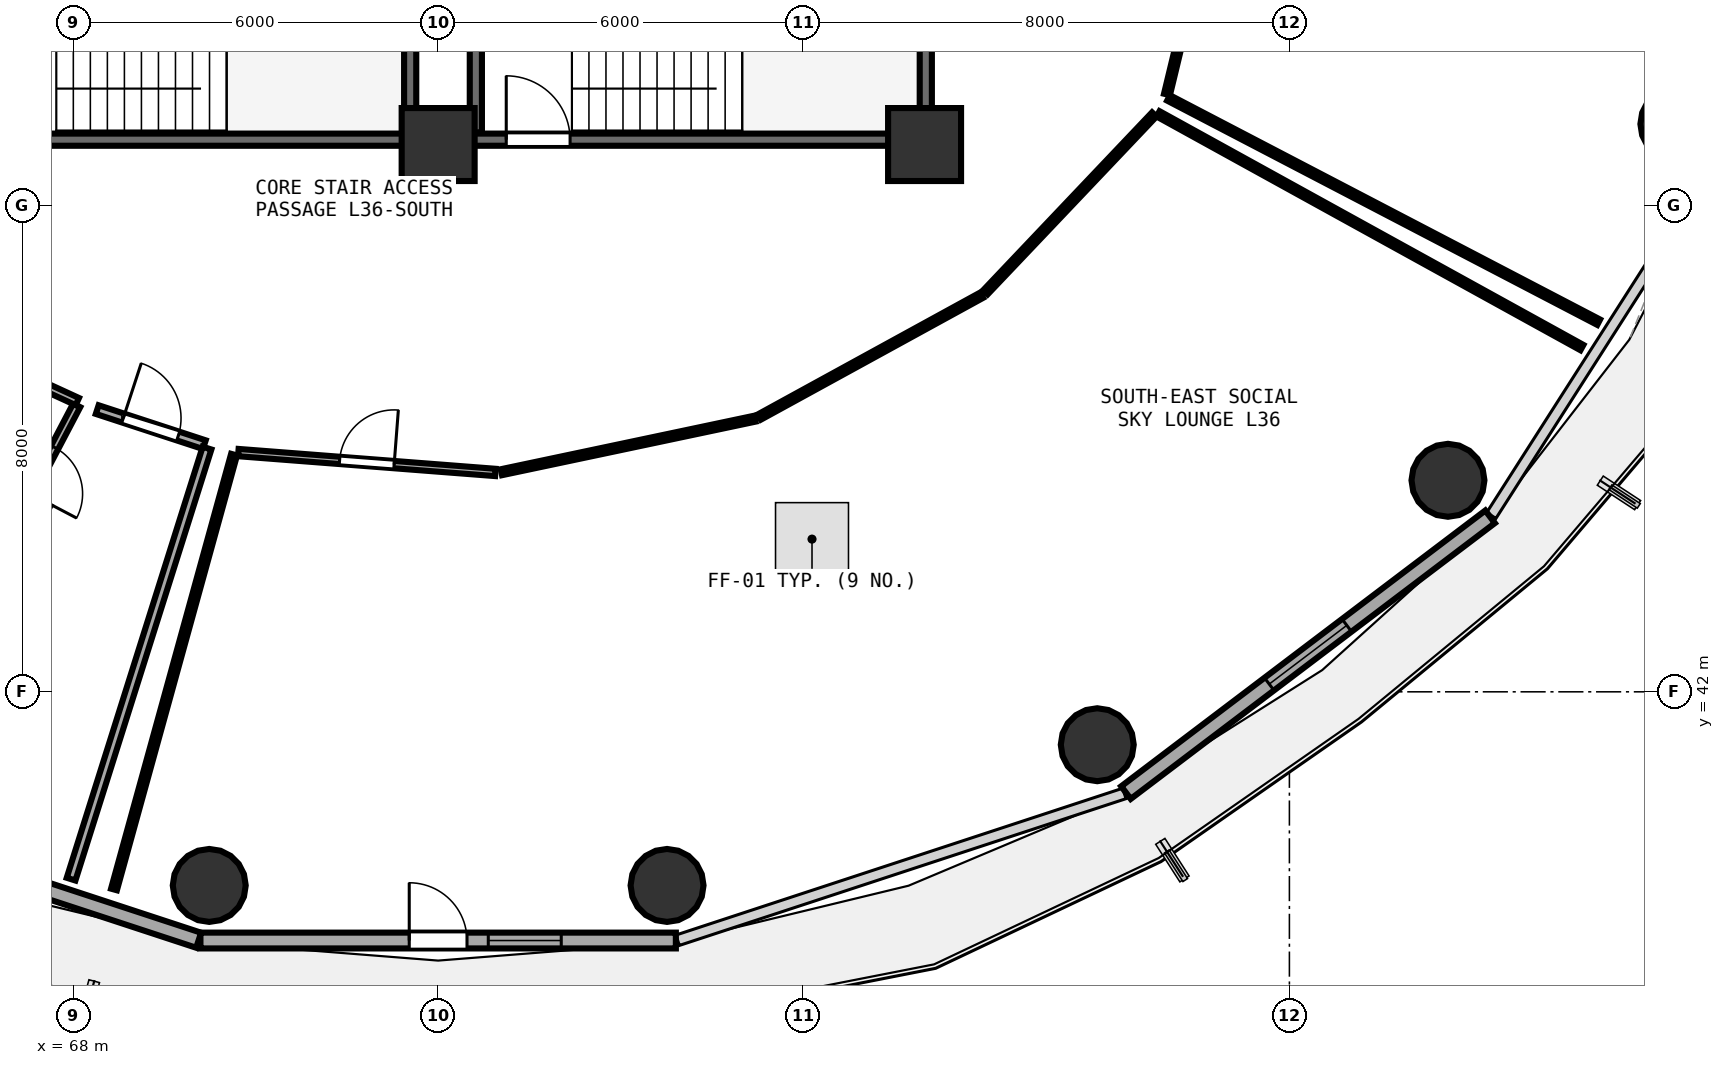
"""IFC4 building model, lengths in metres.
Left out: names, types, materials, properties, quantities, classifications, styles, units other than length and angle.
Written with IfcOpenShell. Run it as: python <this file> out.ifc"""

import sys

from ifc_helpers import new_model, si_unit, direction, frame, frame_2d, origin, origin_2d, place, context, subcontext, project, spatial, rectangle, circle, extrude, element, fill, save


model = new_model("IFC4")
c1 = context("Model", 3, precision=1e-05, world=origin(), true_north=direction((0.0, 1.0)))
c2 = subcontext(c1, "Body", "Model", "MODEL_VIEW")
j1 = project(units=[si_unit("LENGTHUNIT", "METRE"), si_unit("PLANEANGLEUNIT", "RADIAN")], contexts=[c1])
p1 = place(None, origin())
s1 = spatial("IfcSite", under=j1, at=p1, CompositionType="ELEMENT")
p2 = place(p1, origin())
s2 = spatial("IfcBuilding", under=s1, at=p2, CompositionType="ELEMENT")
p3 = place(p2, frame((0.0, 0.0, 143.1)))
s3 = spatial("IfcBuildingStorey", under=s2, at=p3, CompositionType="ELEMENT", Elevation=143.1)
for number, where, z_axis, x_axis in (
    (1, (74.0, 51.0, 0.0), (0.0, 0.0, 1.0), (1.0, 0.0, 0.0)),
    (2, (82.0, 51.0, 0.0), (0.0, 0.0, 1.0), (1.0, 0.0, 0.0)),
):
    element("IfcColumn", number, at=place(p3, frame(where, z_axis=z_axis, x_axis=x_axis)), inside=s3, PredefinedType="PILASTER", context=c2, shape_type="SweptSolid", body=[
        extrude(rectangle(XDim=1.2, YDim=1.2, at=origin_2d()), origin(), (0.0, 0.0, 1.0), 3.75),
    ])
for number, where, z_axis, x_axis in (
    (3, (70.235, 38.816, 0.0), (0.0, 0.0, 1.0), (1.0, 0.0, 0.0)),
    (4, (77.765, 38.816, 0.0), (0.0, 0.0, 1.0), (1.0, 0.0, 0.0)),
    (5, (84.84, 41.13, 0.0), (0.0, 0.0, 1.0), (1.0, 0.0, 0.0)),
    (6, (90.608, 45.479, 0.0), (0.0, 0.0, 1.0), (1.0, 0.0, 0.0)),
    (7, (94.373, 51.337, 0.0), (0.0, 0.0, 1.0), (1.0, 0.0, 0.0)),
):
    element("IfcColumn", number, at=place(p3, frame(where, z_axis=z_axis, x_axis=x_axis)), inside=s3, PredefinedType="COLUMN", context=c2, shape_type="SweptSolid", body=[
        extrude(circle(Radius=0.6, at=origin_2d()), origin(), (0.0, 0.0, 1.0), 3.75),
    ])
p4 = place(p3, frame((62.714, 40.328, 0.0), z_axis=(0.0, 0.0, 1.0), x_axis=(0.950038302428, -0.312133343173, 0.0)))
e8 = element("IfcWall", 8, at=p4, inside=s3, PredefinedType="SOLIDWALL", context=c2, shape_type="SweptSolid", body=[
    extrude(rectangle(XDim=7.733, YDim=0.26, at=frame_2d((3.867, 0.0))), origin(), (0.0, 0.0, 1.0), 3.475),
])
p5 = place(p4, frame((3.067, 0.0, 0.85)))
e9 = element("IfcOpeningElement", 9, at=p5, cuts=e8, PredefinedType="OPENING", context=c2, shape_type="SweptSolid", body=[
    extrude(rectangle(XDim=1.6, YDim=1.45, at=frame_2d((0.8, 0.725))), frame((0.0, 0.14, 0.0), z_axis=(0.0, -1.0, 0.0), x_axis=(1.0, 0.0, 0.0)), (0.0, 0.0, 1.0), 0.28),
])
p6 = place(p3, frame((70.091, 37.91, 0.0), z_axis=(0.0, 0.0, 1.0), x_axis=(1.0, 0.0, 0.0)))
e10 = element("IfcWall", 10, at=p6, inside=s3, PredefinedType="SOLIDWALL", context=c2, shape_type="SweptSolid", body=[
    extrude(rectangle(XDim=7.819, YDim=0.26, at=frame_2d((3.909, 0.0))), origin(), (0.0, 0.0, 1.0), 3.475),
])
p7 = place(p6, frame((3.434, 0.0, 0.0)))
e11 = element("IfcOpeningElement", 11, at=p7, cuts=e10, PredefinedType="OPENING", context=c2, shape_type="SweptSolid", body=[
    extrude(rectangle(XDim=0.95, YDim=2.1, at=frame_2d((0.475, 1.05))), frame((0.0, 0.14, 0.0), z_axis=(0.0, -1.0, 0.0), x_axis=(1.0, 0.0, 0.0)), (0.0, 0.0, 1.0), 0.28),
])
p8 = place(p6, frame((4.734, 0.0, 0.85)))
e12 = element("IfcOpeningElement", 12, at=p8, cuts=e10, PredefinedType="OPENING", context=c2, shape_type="SweptSolid", body=[
    extrude(rectangle(XDim=1.2, YDim=1.45, at=frame_2d((0.6, 0.725))), frame((0.0, 0.14, 0.0), z_axis=(0.0, -1.0, 0.0), x_axis=(1.0, 0.0, 0.0)), (0.0, 0.0, 1.0), 0.28),
])
p9 = place(p3, frame((85.312, 40.342, 0.0), z_axis=(0.0, 0.0, 1.0), x_axis=(0.797163719609, 0.603763202042, 0.0)))
e13 = element("IfcWall", 13, at=p9, inside=s3, PredefinedType="SOLIDWALL", context=c2, shape_type="SweptSolid", body=[
    extrude(rectangle(XDim=7.512, YDim=0.26, at=frame_2d((3.756, 0.0))), origin(), (0.0, 0.0, 1.0), 3.475),
])
p10 = place(p9, frame((2.956, 0.0, 0.85)))
e14 = element("IfcOpeningElement", 14, at=p10, cuts=e13, PredefinedType="OPENING", context=c2, shape_type="SweptSolid", body=[
    extrude(rectangle(XDim=1.6, YDim=1.45, at=frame_2d((0.8, 0.725))), frame((0.0, 0.14, 0.0), z_axis=(0.0, -1.0, 0.0), x_axis=(1.0, 0.0, 0.0)), (0.0, 0.0, 1.0), 0.28),
])
p11 = place(p3, frame((74.0, 51.08, 0.0), z_axis=(0.0, 0.0, 1.0), x_axis=(1.0, 0.0, 0.0)))
e15 = element("IfcWall", 15, at=p11, inside=s3, PredefinedType="SHEAR", context=c2, shape_type="SweptSolid", body=[
    extrude(rectangle(XDim=7.9, YDim=0.2, at=frame_2d((3.95, 0.0))), origin(), (0.0, 0.0, 1.0), 3.49),
])
p12 = place(p11, frame((1.12, 0.0, 0.0)))
e16 = element("IfcOpeningElement", 16, at=p12, cuts=e15, PredefinedType="OPENING", context=c2, shape_type="SweptSolid", body=[
    extrude(rectangle(XDim=1.05, YDim=2.1, at=frame_2d((0.525, 1.05))), frame((0.0, 0.11, 0.0), z_axis=(0.0, -1.0, 0.0), x_axis=(1.0, 0.0, 0.0)), (0.0, 0.0, 1.0), 0.22),
])
for number, where, z_axis, x_axis in (
    (17, (82.02, 51.2, 0.0), (0.0, 0.0, 1.0), (0.0, 1.0, 0.0)),
    (18, (74.62, 54.27, 0.0), (0.0, 0.0, 1.0), (0.0, -1.0, 0.0)),
):
    element("IfcWall", number, at=place(p3, frame(where, z_axis=z_axis, x_axis=x_axis)), inside=s3, PredefinedType="SHEAR", context=c2, shape_type="SweptSolid", body=[
        extrude(rectangle(XDim=3.07, YDim=0.2, at=frame_2d((1.535, 0.0))), origin(), (0.0, 0.0, 1.0), 3.49),
    ])
p13 = place(p3, frame((66.26, 51.08, 0.0), z_axis=(0.0, 0.0, 1.0), x_axis=(1.0, 0.0, 0.0)))
e19 = element("IfcWall", 19, at=p13, inside=s3, PredefinedType="SHEAR", context=c2, shape_type="SweptSolid", body=[
    extrude(rectangle(XDim=7.16, YDim=0.2, at=frame_2d((3.58, 0.0))), origin(), (0.0, 0.0, 1.0), 3.49),
])
p14 = place(p3, frame((73.54, 51.2, 0.0), z_axis=(0.0, 0.0, 1.0), x_axis=(0.0, 1.0, 0.0)))
e20 = element("IfcWall", 20, at=p14, inside=s3, PredefinedType="SHEAR", context=c2, shape_type="SweptSolid", body=[
    extrude(rectangle(XDim=3.07, YDim=0.2, at=frame_2d((1.535, 0.0))), origin(), (0.0, 0.0, 1.0), 3.49),
])
p15 = place(p3, frame((70.714, 45.934, 0.0), z_axis=(0.0, 0.0, 1.0), x_axis=(0.99702766625, -0.077044355613, 0.0)))
e21 = element("IfcWall", 21, at=p15, inside=s3, PredefinedType="PARTITIONING", context=c2, shape_type="SweptSolid", body=[
    extrude(rectangle(XDim=4.24, YDim=0.12, at=frame_2d((2.12, 0.0))), origin(), (0.0, 0.0, 1.0), 2.975),
])
p16 = place(p15, frame((1.67, 0.0, 0.0)))
e22 = element("IfcOpeningElement", 22, at=p16, cuts=e21, PredefinedType="OPENING", context=c2, shape_type="SweptSolid", body=[
    extrude(rectangle(XDim=0.9, YDim=2.08, at=frame_2d((0.45, 1.04))), frame((0.0, 0.07, 0.0), z_axis=(0.0, -1.0, 0.0), x_axis=(1.0, 0.0, 0.0)), (0.0, 0.0, 1.0), 0.14),
])
p17 = place(p3, frame((68.056, 46.712, 0.0), z_axis=(0.0, 0.0, 1.0), x_axis=(-0.464721454244, -0.885456927222, 0.0)))
e23 = element("IfcWall", 23, at=p17, inside=s3, PredefinedType="PLUMBINGWALL", context=c2, shape_type="SweptSolid", body=[
    extrude(rectangle(XDim=2.426, YDim=0.13, at=frame_2d((1.213, 0.0))), origin(), (0.0, 0.0, 1.0), 3.175),
])
p18 = place(p17, frame((0.783, 0.0, 0.0)))
e24 = element("IfcOpeningElement", 24, at=p18, cuts=e23, PredefinedType="OPENING", context=c2, shape_type="SweptSolid", body=[
    extrude(rectangle(XDim=0.86, YDim=2.05, at=frame_2d((0.43, 1.025))), frame((0.0, 0.075, 0.0), z_axis=(0.0, -1.0, 0.0), x_axis=(1.0, 0.0, 0.0)), (0.0, 0.0, 1.0), 0.15),
])
p19 = place(p3, frame((68.393, 46.641, 0.0), z_axis=(0.0, 0.0, 1.0), x_axis=(0.950343295829, -0.311203502668, 0.0)))
e25 = element("IfcWall", 25, at=p19, inside=s3, PredefinedType="PARTITIONING", context=c2, shape_type="SweptSolid", body=[
    extrude(rectangle(XDim=1.853, YDim=0.15, at=frame_2d((0.927, 0.0))), origin(), (0.0, 0.0, 1.0), 3.48),
])
p20 = place(p19, frame((0.451, 0.0, 0.0)))
e26 = element("IfcOpeningElement", 26, at=p20, cuts=e25, PredefinedType="OPENING", context=c2, shape_type="SweptSolid", body=[
    extrude(rectangle(XDim=0.95, YDim=2.08, at=frame_2d((0.475, 1.04))), frame((0.0, 0.085, 0.0), z_axis=(0.0, -1.0, 0.0), x_axis=(1.0, 0.0, 0.0)), (0.0, 0.0, 1.0), 0.17),
])
p21 = place(p3, frame((75.04, 45.611, 0.0), z_axis=(0.0, 0.0, 1.0), x_axis=(0.978421930287, 0.206616858785, 0.0)))
e27 = element("IfcWall", 27, at=p21, inside=s3, PredefinedType="PARTITIONING", context=c2, shape_type="SweptSolid", body=[
    extrude(rectangle(XDim=4.261, YDim=0.1, at=frame_2d((2.13, 0.0))), origin(), (0.0, 0.0, 1.0), 2.975),
])
p22 = place(p3, frame((79.283, 46.519, 0.0), z_axis=(0.0, 0.0, 1.0), x_axis=(0.876994001609, 0.480501322726, 0.0)))
e28 = element("IfcWall", 28, at=p22, inside=s3, PredefinedType="PARTITIONING", context=c2, shape_type="SweptSolid", body=[
    extrude(rectangle(XDim=4.167, YDim=0.1, at=frame_2d((2.084, 0.0))), origin(), (0.0, 0.0, 1.0), 2.975),
])
p23 = place(p3, frame((83.0, 48.57, 0.0), z_axis=(0.0, 0.0, 1.0), x_axis=(0.688528308603, 0.725209465088, 0.0)))
e29 = element("IfcWall", 29, at=p23, inside=s3, PredefinedType="PARTITIONING", context=c2, shape_type="SweptSolid", body=[
    extrude(rectangle(XDim=4.033, YDim=0.1, at=frame_2d((2.017, 0.0))), origin(), (0.0, 0.0, 1.0), 2.975),
])
p24 = place(p3, frame((85.84, 51.505, 0.0), z_axis=(0.0, 0.0, 1.0), x_axis=(0.875725262543, -0.482809760199, 0.0)))
e30 = element("IfcWall", 30, at=p24, inside=s3, PredefinedType="PARTITIONING", context=c2, shape_type="SweptSolid", body=[
    extrude(rectangle(XDim=7.96, YDim=0.1, at=frame_2d((3.98, 0.0))), origin(), (0.0, 0.0, 1.0), 2.975),
])
p25 = place(p3, frame((68.669, 38.75, 0.0), z_axis=(0.0, 0.0, 1.0), x_axis=(0.26617364863, 0.963925095002, 0.0)))
e31 = element("IfcWall", 31, at=p25, inside=s3, PredefinedType="PARTITIONING", context=c2, shape_type="SweptSolid", body=[
    extrude(rectangle(XDim=7.418, YDim=0.1, at=frame_2d((3.709, 0.0))), origin(), (0.0, 0.0, 1.0), 3.025),
])
p26 = place(p3, frame((85.986, 51.824, 0.0), z_axis=(0.0, 0.0, 1.0), x_axis=(0.234816749424, 0.972039656696, 0.0)))
e32 = element("IfcWall", 32, at=p26, inside=s3, PredefinedType="PARTITIONING", context=c2, shape_type="SweptSolid", body=[
    extrude(rectangle(XDim=7.539, YDim=0.1, at=frame_2d((3.77, 0.0))), origin(), (0.0, 0.0, 1.0), 2.975),
])
p27 = place(p3, frame((93.086, 48.079, 0.0), z_axis=(0.0, 0.0, 1.0), x_axis=(-0.886727770337, 0.462291965443, 0.0)))
e33 = element("IfcWall", 33, at=p27, inside=s3, PredefinedType="PARTITIONING", context=c2, shape_type="SweptSolid", body=[
    extrude(rectangle(XDim=7.978, YDim=0.1, at=frame_2d((3.989, 0.0))), origin(), (0.0, 0.0, 1.0), 2.975),
])
p28 = place(p3, frame((67.363, 47.096, 0.0), z_axis=(0.0, 0.0, 1.0), x_axis=(0.908835433781, -0.417154832531, 0.0)))
e34 = element("IfcWall", 34, at=p28, inside=s3, PredefinedType="PLUMBINGWALL", context=c2, shape_type="SweptSolid", body=[
    extrude(rectangle(XDim=0.773, YDim=0.13, at=frame_2d((0.387, 0.0))), origin(), (0.0, 0.0, 1.0), 3.235),
])
p29 = place(p3, frame((70.199, 46.008, 0.0), z_axis=(0.0, 0.0, 1.0), x_axis=(-0.300834252316, -0.953676440222, 0.0)))
e35 = element("IfcWall", 35, at=p29, inside=s3, PredefinedType="PARTITIONING", context=c2, shape_type="SweptSolid", body=[
    extrude(rectangle(XDim=7.433, YDim=0.15, at=frame_2d((3.716, 0.0))), origin(), (0.0, 0.0, 1.0), 3.025),
])
p30 = place(p7, frame((0.95, 0.0, 0.0), z_axis=(0.0, 0.0, 1.0), x_axis=(-1.0, 0.0, 0.0)))
e36 = element("IfcDoor", 36, at=p30, inside=s3, OperationType="SINGLE_SWING_RIGHT", PredefinedType="DOOR", context=c2, shape_type="SweptSolid", body=[
    extrude(rectangle(XDim=0.95, YDim=2.1, at=frame_2d((0.475, 1.05))), frame((0.0, 0.025, 0.0), z_axis=(0.0, -1.0, 0.0), x_axis=(1.0, 0.0, 0.0)), (0.0, 0.0, 1.0), 0.05),
])
fill(e11, e36)
p31 = place(p8, origin())
e37 = element("IfcWindow", 37, at=p31, inside=s3, PartitioningType="SINGLE_PANEL", PredefinedType="WINDOW", context=c2, shape_type="SweptSolid", body=[
    extrude(rectangle(XDim=1.2, YDim=1.45, at=frame_2d((0.6, 0.725))), frame((0.0, 0.03, 0.0), z_axis=(0.0, -1.0, 0.0), x_axis=(1.0, 0.0, 0.0)), (0.0, 0.0, 1.0), 0.06),
])
fill(e12, e37)
p32 = place(p10, origin())
e38 = element("IfcWindow", 38, at=p32, inside=s3, PartitioningType="SINGLE_PANEL", PredefinedType="WINDOW", context=c2, shape_type="SweptSolid", body=[
    extrude(rectangle(XDim=1.6, YDim=1.45, at=frame_2d((0.8, 0.725))), frame((0.0, 0.03, 0.0), z_axis=(0.0, -1.0, 0.0), x_axis=(1.0, 0.0, 0.0)), (0.0, 0.0, 1.0), 0.06),
])
fill(e14, e38)
p33 = place(p12, origin())
e39 = element("IfcDoor", 39, at=p33, inside=s3, OperationType="SINGLE_SWING_LEFT", PredefinedType="DOOR", context=c2, shape_type="SweptSolid", body=[
    extrude(rectangle(XDim=1.05, YDim=2.1, at=frame_2d((0.525, 1.05))), frame((0.0, 0.025, 0.0), z_axis=(0.0, -1.0, 0.0), x_axis=(1.0, 0.0, 0.0)), (0.0, 0.0, 1.0), 0.05),
])
fill(e16, e39)
p34 = place(p16, origin())
e40 = element("IfcDoor", 40, at=p34, inside=s3, OperationType="SINGLE_SWING_RIGHT", PredefinedType="DOOR", context=c2, shape_type="SweptSolid", body=[
    extrude(rectangle(XDim=0.9, YDim=2.08, at=frame_2d((0.45, 1.04))), frame((0.0, 0.025, 0.0), z_axis=(0.0, -1.0, 0.0), x_axis=(1.0, 0.0, 0.0)), (0.0, 0.0, 1.0), 0.05),
])
fill(e22, e40)
p35 = place(p18, origin())
e41 = element("IfcDoor", 41, at=p35, inside=s3, OperationType="SINGLE_SWING_RIGHT", PredefinedType="DOOR", context=c2, shape_type="SweptSolid", body=[
    extrude(rectangle(XDim=0.86, YDim=2.05, at=frame_2d((0.43, 1.025))), frame((0.0, 0.025, 0.0), z_axis=(0.0, -1.0, 0.0), x_axis=(1.0, 0.0, 0.0)), (0.0, 0.0, 1.0), 0.05),
])
fill(e24, e41)
p36 = place(p20, origin())
e42 = element("IfcDoor", 42, at=p36, inside=s3, OperationType="SINGLE_SWING_LEFT", PredefinedType="DOOR", context=c2, shape_type="SweptSolid", body=[
    extrude(rectangle(XDim=0.95, YDim=2.08, at=frame_2d((0.475, 1.04))), frame((0.0, 0.025, 0.0), z_axis=(0.0, -1.0, 0.0), x_axis=(1.0, 0.0, 0.0)), (0.0, 0.0, 1.0), 0.05),
])
fill(e26, e42)
save(model, sys.argv[1])
